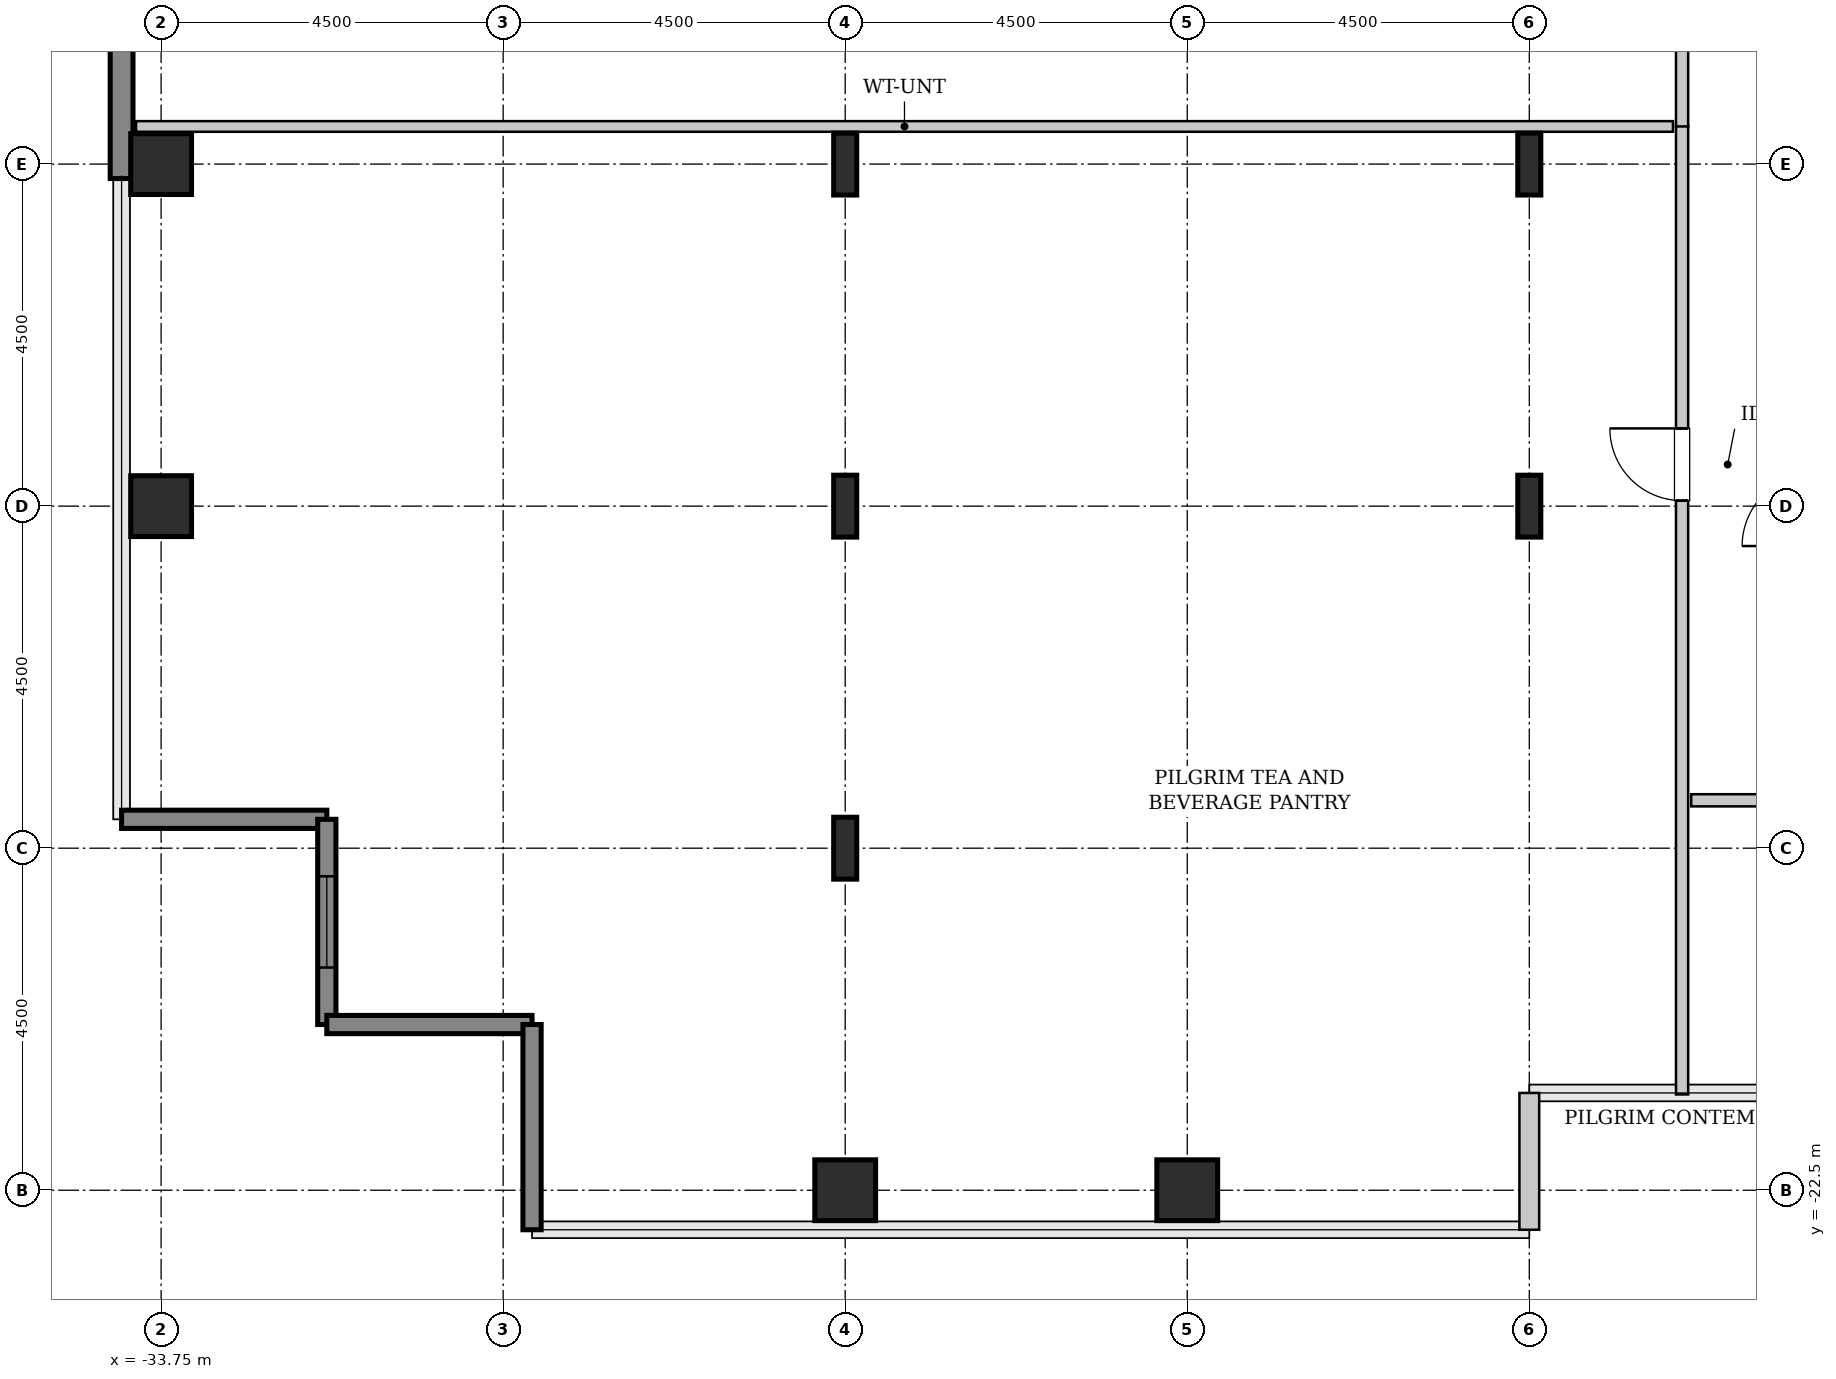
"""IFC4 building model, lengths in metres.
Left out: names, types, materials, properties, quantities, classifications, styles, units other than length and angle.
Written with IfcOpenShell. Run it as: python <this file> out.ifc"""

import sys

from ifc_helpers import new_model, si_unit, direction, frame, frame_2d, origin, origin_2d, place, context, subcontext, project, spatial, rectangle, hollow_rectangle, i_section, extrude, source, transform, mapped, element, fill, save


model = new_model("IFC4")
c1 = context("Model", 3, precision=1e-05, world=origin(), true_north=direction((0.0, 1.0)))
c2 = subcontext(c1, "Body", "Model", "MODEL_VIEW")
j1 = project(units=[si_unit("LENGTHUNIT", "METRE"), si_unit("PLANEANGLEUNIT", "RADIAN")], contexts=[c1])
p1 = place(None, origin())
s1 = spatial("IfcSite", under=j1, at=p1, CompositionType="ELEMENT")
p2 = place(p1, origin())
s2 = spatial("IfcBuilding", under=s1, at=p2, CompositionType="ELEMENT")
p3 = place(p2, frame((0.0, 0.0, 160.2)))
s3 = spatial("IfcBuildingStorey", under=s2, at=p3, CompositionType="ELEMENT", Elevation=160.2)
m1 = source(origin(), c2, "Body", "SweptSolid", [
    extrude(hollow_rectangle(XDim=0.8, YDim=0.8, WallThickness=0.04, InnerFilletRadius=0.04, OuterFilletRadius=0.08, at=origin_2d()), origin(), (0.0, 0.0, 1.0), 3.8),
])
for number, where, z_axis, x_axis in (
    (1, (-33.75, -13.5, 0.0), (0.0, 0.0, 1.0), (1.0, 0.0, 0.0)),
    (2, (-33.75, -9.0, 0.0), (0.0, 0.0, 1.0), (1.0, 0.0, 0.0)),
    (3, (-24.75, -22.5, 0.0), (0.0, 0.0, 1.0), (1.0, 0.0, 0.0)),
):
    element("IfcColumn", number, at=place(p3, frame(where, z_axis=z_axis, x_axis=x_axis)), inside=s3, PredefinedType="COLUMN", context=c2, shape_type="MappedRepresentation", body=[
        mapped(m1, transform((0.0, 0.0, 0.0), x_axis=(1.0, 0.0, 0.0), y_axis=(0.0, 1.0, 0.0), z_axis=(0.0, 0.0, 1.0), scale=1.0)),
    ])
m2 = source(origin(), c2, "Body", "SweptSolid", [
    extrude(i_section(OverallWidth=0.303, OverallDepth=0.814, WebThickness=0.021, FlangeThickness=0.04, FilletRadius=0.03, at=origin_2d()), origin(), (0.0, 0.0, 1.0), 3.8),
])
for number, where, z_axis, x_axis in (
    (4, (-24.75, -18.0, 0.0), (0.0, 0.0, 1.0), (1.0, 0.0, 0.0)),
    (5, (-24.75, -13.5, 0.0), (0.0, 0.0, 1.0), (1.0, 0.0, 0.0)),
    (6, (-24.75, -9.0, 0.0), (0.0, 0.0, 1.0), (1.0, 0.0, 0.0)),
):
    element("IfcColumn", number, at=place(p3, frame(where, z_axis=z_axis, x_axis=x_axis)), inside=s3, PredefinedType="COLUMN", context=c2, shape_type="MappedRepresentation", body=[
        mapped(m2, transform((0.0, 0.0, 0.0), x_axis=(1.0, 0.0, 0.0), y_axis=(0.0, 1.0, 0.0), z_axis=(0.0, 0.0, 1.0), scale=1.0)),
    ])
p4 = place(p3, frame((-20.25, -22.5, 0.0), z_axis=(0.0, 0.0, 1.0), x_axis=(1.0, 0.0, 0.0)))
e7 = element("IfcColumn", 7, at=p4, inside=s3, PredefinedType="COLUMN", context=c2, shape_type="MappedRepresentation", body=[
    mapped(m1, transform((0.0, 0.0, 0.0), x_axis=(1.0, 0.0, 0.0), y_axis=(0.0, 1.0, 0.0), z_axis=(0.0, 0.0, 1.0), scale=1.0)),
])
for number, where, z_axis, x_axis in (
    (8, (-15.75, -13.5, 0.0), (0.0, 0.0, 1.0), (1.0, 0.0, 0.0)),
    (9, (-15.75, -9.0, 0.0), (0.0, 0.0, 1.0), (1.0, 0.0, 0.0)),
):
    element("IfcColumn", number, at=place(p3, frame(where, z_axis=z_axis, x_axis=x_axis)), inside=s3, PredefinedType="COLUMN", context=c2, shape_type="MappedRepresentation", body=[
        mapped(m2, transform((0.0, 0.0, 0.0), x_axis=(1.0, 0.0, 0.0), y_axis=(0.0, 1.0, 0.0), z_axis=(0.0, 0.0, 1.0), scale=1.0)),
    ])
m3 = source(origin(), c2, "Body", "SweptSolid", [
    extrude(rectangle(XDim=4.88, YDim=0.3, at=frame_2d((2.44, 0.0))), origin(), (0.0, 0.0, 1.0), 3.55),
])
p5 = place(p3, frame((-34.27, -9.19, 0.0), z_axis=(0.0, 0.0, 1.0), x_axis=(0.0, 1.0, 0.0)))
e10 = element("IfcWall", 10, at=p5, inside=s3, PredefinedType="SHEAR", context=c2, shape_type="MappedRepresentation", body=[
    mapped(m3, transform((0.0, 0.0, 0.0), x_axis=(1.0, 0.0, 0.0), y_axis=(0.0, 1.0, 0.0), z_axis=(0.0, 0.0, 1.0), scale=1.0)),
])
m4 = source(origin(), c2, "Body", "SweptSolid", [
    extrude(rectangle(XDim=2.7, YDim=0.24, at=frame_2d((1.35, 0.0))), origin(), (0.0, 0.0, 1.0), 3.55),
])
p6 = place(p3, frame((-34.27, -17.62, 0.0), z_axis=(0.0, 0.0, 1.0), x_axis=(1.0, 0.0, 0.0)))
e11 = element("IfcWall", 11, at=p6, inside=s3, PredefinedType="SHEAR", context=c2, shape_type="MappedRepresentation", body=[
    mapped(m4, transform((0.0, 0.0, 0.0), x_axis=(1.0, 0.0, 0.0), y_axis=(0.0, 1.0, 0.0), z_axis=(0.0, 0.0, 1.0), scale=1.0)),
])
p7 = place(p3, frame((-31.57, -17.62, 0.0), z_axis=(0.0, 0.0, 1.0), x_axis=(0.0, -1.0, 0.0)))
e12 = element("IfcWall", 12, at=p7, inside=s3, PredefinedType="SHEAR", context=c2, shape_type="MappedRepresentation", body=[
    mapped(m4, transform((0.0, 0.0, 0.0), x_axis=(1.0, 0.0, 0.0), y_axis=(0.0, 1.0, 0.0), z_axis=(0.0, 0.0, 1.0), scale=1.0)),
])
p8 = place(p7, frame((0.75, 0.0, 0.85)))
e13 = element("IfcOpeningElement", 13, at=p8, cuts=e12, PredefinedType="OPENING", context=c2, shape_type="SweptSolid", body=[
    extrude(rectangle(XDim=1.2, YDim=1.8, at=frame_2d((0.6, 0.9))), frame((0.0, 0.13, 0.0), z_axis=(0.0, -1.0, 0.0), x_axis=(1.0, 0.0, 0.0)), (0.0, 0.0, 1.0), 0.26),
])
for number, where, z_axis, x_axis in (
    (14, (-31.57, -20.32, 0.0), (0.0, 0.0, 1.0), (1.0, 0.0, 0.0)),
    (15, (-28.87, -20.32, 0.0), (0.0, 0.0, 1.0), (0.0, -1.0, 0.0)),
):
    element("IfcWall", number, at=place(p3, frame(where, z_axis=z_axis, x_axis=x_axis)), inside=s3, PredefinedType="SHEAR", context=c2, shape_type="MappedRepresentation", body=[
        mapped(m4, transform((0.0, 0.0, 0.0), x_axis=(1.0, 0.0, 0.0), y_axis=(0.0, 1.0, 0.0), z_axis=(0.0, 0.0, 1.0), scale=1.0)),
    ])
m5 = source(origin(), c2, "Body", "SweptSolid", [
    extrude(rectangle(XDim=1.8, YDim=0.26, at=frame_2d((0.9, 0.0))), origin(), (0.0, 0.0, 1.0), 3.55),
])
p9 = place(p3, frame((-15.75, -23.02, 0.0), z_axis=(0.0, 0.0, 1.0), x_axis=(0.0, 1.0, 0.0)))
e16 = element("IfcWall", 16, at=p9, inside=s3, PredefinedType="SOLIDWALL", context=c2, shape_type="MappedRepresentation", body=[
    mapped(m5, transform((0.0, 0.0, 0.0), x_axis=(1.0, 0.0, 0.0), y_axis=(0.0, 1.0, 0.0), z_axis=(0.0, 0.0, 1.0), scale=1.0)),
])
m6 = source(origin(), c2, "Body", "SweptSolid", [
    extrude(rectangle(XDim=12.745, YDim=0.16, at=frame_2d((6.373, 0.0))), origin(), (0.0, 0.0, 1.0), 3.535),
])
p10 = place(p3, frame((-13.74, -21.24, 0.0), z_axis=(0.0, 0.0, 1.0), x_axis=(0.0, 1.0, 0.0)))
e17 = element("IfcWall", 17, at=p10, inside=s3, PredefinedType="PARTITIONING", context=c2, shape_type="MappedRepresentation", body=[
    mapped(m6, transform((0.0, 0.0, 0.0), x_axis=(1.0, 0.0, 0.0), y_axis=(0.0, 1.0, 0.0), z_axis=(0.0, 0.0, 1.0), scale=1.0)),
])
p11 = place(p10, frame((7.812, 0.0, 0.0)))
e18 = element("IfcOpeningElement", 18, at=p11, cuts=e17, PredefinedType="OPENING", context=c2, shape_type="SweptSolid", body=[
    extrude(rectangle(XDim=0.95, YDim=2.1, at=frame_2d((0.475, 1.05))), frame((0.0, 0.09, 0.0), z_axis=(0.0, -1.0, 0.0), x_axis=(1.0, 0.0, 0.0)), (0.0, 0.0, 1.0), 0.18),
])
m7 = source(origin(), c2, "Body", "SweptSolid", [
    extrude(rectangle(XDim=20.22, YDim=0.14, at=frame_2d((10.11, 0.0))), origin(), (0.0, 0.0, 1.0), 2.875),
])
p12 = place(p3, frame((-34.08, -8.505, 0.0), z_axis=(0.0, 0.0, 1.0), x_axis=(1.0, 0.0, 0.0)))
e19 = element("IfcWall", 19, at=p12, inside=s3, PredefinedType="PARTITIONING", context=c2, shape_type="MappedRepresentation", body=[
    mapped(m7, transform((0.0, 0.0, 0.0), x_axis=(1.0, 0.0, 0.0), y_axis=(0.0, 1.0, 0.0), z_axis=(0.0, 0.0, 1.0), scale=1.0)),
])
m8 = source(origin(), c2, "Body", "SweptSolid", [
    extrude(rectangle(XDim=3.41, YDim=0.16, at=frame_2d((1.705, 0.0))), origin(), (0.0, 0.0, 1.0), 3.535),
])
p13 = place(p3, frame((-13.74, -8.505, 0.0), z_axis=(0.0, 0.0, 1.0), x_axis=(0.0, 1.0, 0.0)))
e20 = element("IfcWall", 20, at=p13, inside=s3, PredefinedType="PARTITIONING", context=c2, shape_type="MappedRepresentation", body=[
    mapped(m8, transform((0.0, 0.0, 0.0), x_axis=(1.0, 0.0, 0.0), y_axis=(0.0, 1.0, 0.0), z_axis=(0.0, 0.0, 1.0), scale=1.0)),
])
p14 = place(p13, frame((1.23, 0.0, 0.0)))
e21 = element("IfcOpeningElement", 21, at=p14, cuts=e20, PredefinedType="OPENING", context=c2, shape_type="SweptSolid", body=[
    extrude(rectangle(XDim=0.95, YDim=2.1, at=frame_2d((0.475, 1.05))), frame((0.0, 0.09, 0.0), z_axis=(0.0, -1.0, 0.0), x_axis=(1.0, 0.0, 0.0)), (0.0, 0.0, 1.0), 0.18),
])
m9 = source(origin(), c2, "Body", "SweptSolid", [
    extrude(rectangle(XDim=5.025, YDim=0.16, at=frame_2d((2.513, 0.0))), origin(), (0.0, 0.0, 1.0), 3.535),
])
p15 = place(p3, frame((-13.62, -17.37, 0.0), z_axis=(0.0, 0.0, 1.0), x_axis=(1.0, 0.0, 0.0)))
e22 = element("IfcWall", 22, at=p15, inside=s3, PredefinedType="PARTITIONING", context=c2, shape_type="MappedRepresentation", body=[
    mapped(m9, transform((0.0, 0.0, 0.0), x_axis=(1.0, 0.0, 0.0), y_axis=(0.0, 1.0, 0.0), z_axis=(0.0, 0.0, 1.0), scale=1.0)),
])
p16 = place(p15, frame((2.881, 0.0, 0.0)))
e23 = element("IfcOpeningElement", 23, at=p16, cuts=e22, PredefinedType="OPENING", context=c2, shape_type="SweptSolid", body=[
    extrude(rectangle(XDim=0.95, YDim=2.1, at=frame_2d((0.475, 1.05))), frame((0.0, 0.09, 0.0), z_axis=(0.0, -1.0, 0.0), x_axis=(1.0, 0.0, 0.0)), (0.0, 0.0, 1.0), 0.18),
])
m10 = source(origin(), c2, "Body", "SweptSolid", [
    extrude(rectangle(XDim=1.2, YDim=1.8, at=frame_2d((0.6, 0.9))), frame((0.0, 0.03, 0.0), z_axis=(0.0, -1.0, 0.0), x_axis=(1.0, 0.0, 0.0)), (0.0, 0.0, 1.0), 0.06),
])
p17 = place(p8, origin())
e24 = element("IfcWindow", 24, at=p17, inside=s3, PartitioningType="SINGLE_PANEL", PredefinedType="WINDOW", context=c2, shape_type="MappedRepresentation", body=[
    mapped(m10, transform((0.0, 0.0, 0.0), x_axis=(1.0, 0.0, 0.0), y_axis=(0.0, 1.0, 0.0), z_axis=(0.0, 0.0, 1.0), scale=1.0)),
])
fill(e13, e24)
m11 = source(origin(), c2, "Body", "SweptSolid", [
    extrude(rectangle(XDim=0.95, YDim=2.1, at=frame_2d((0.475, 1.05))), frame((0.0, 0.025, 0.0), z_axis=(0.0, -1.0, 0.0), x_axis=(1.0, 0.0, 0.0)), (0.0, 0.0, 1.0), 0.05),
])
p18 = place(p11, origin())
e25 = element("IfcDoor", 25, at=p18, inside=s3, OperationType="SINGLE_SWING_RIGHT", PredefinedType="DOOR", context=c2, shape_type="MappedRepresentation", body=[
    mapped(m11, transform((0.0, 0.0, 0.0), x_axis=(1.0, 0.0, 0.0), y_axis=(0.0, 1.0, 0.0), z_axis=(0.0, 0.0, 1.0), scale=1.0)),
])
fill(e18, e25)
save(model, sys.argv[1])
